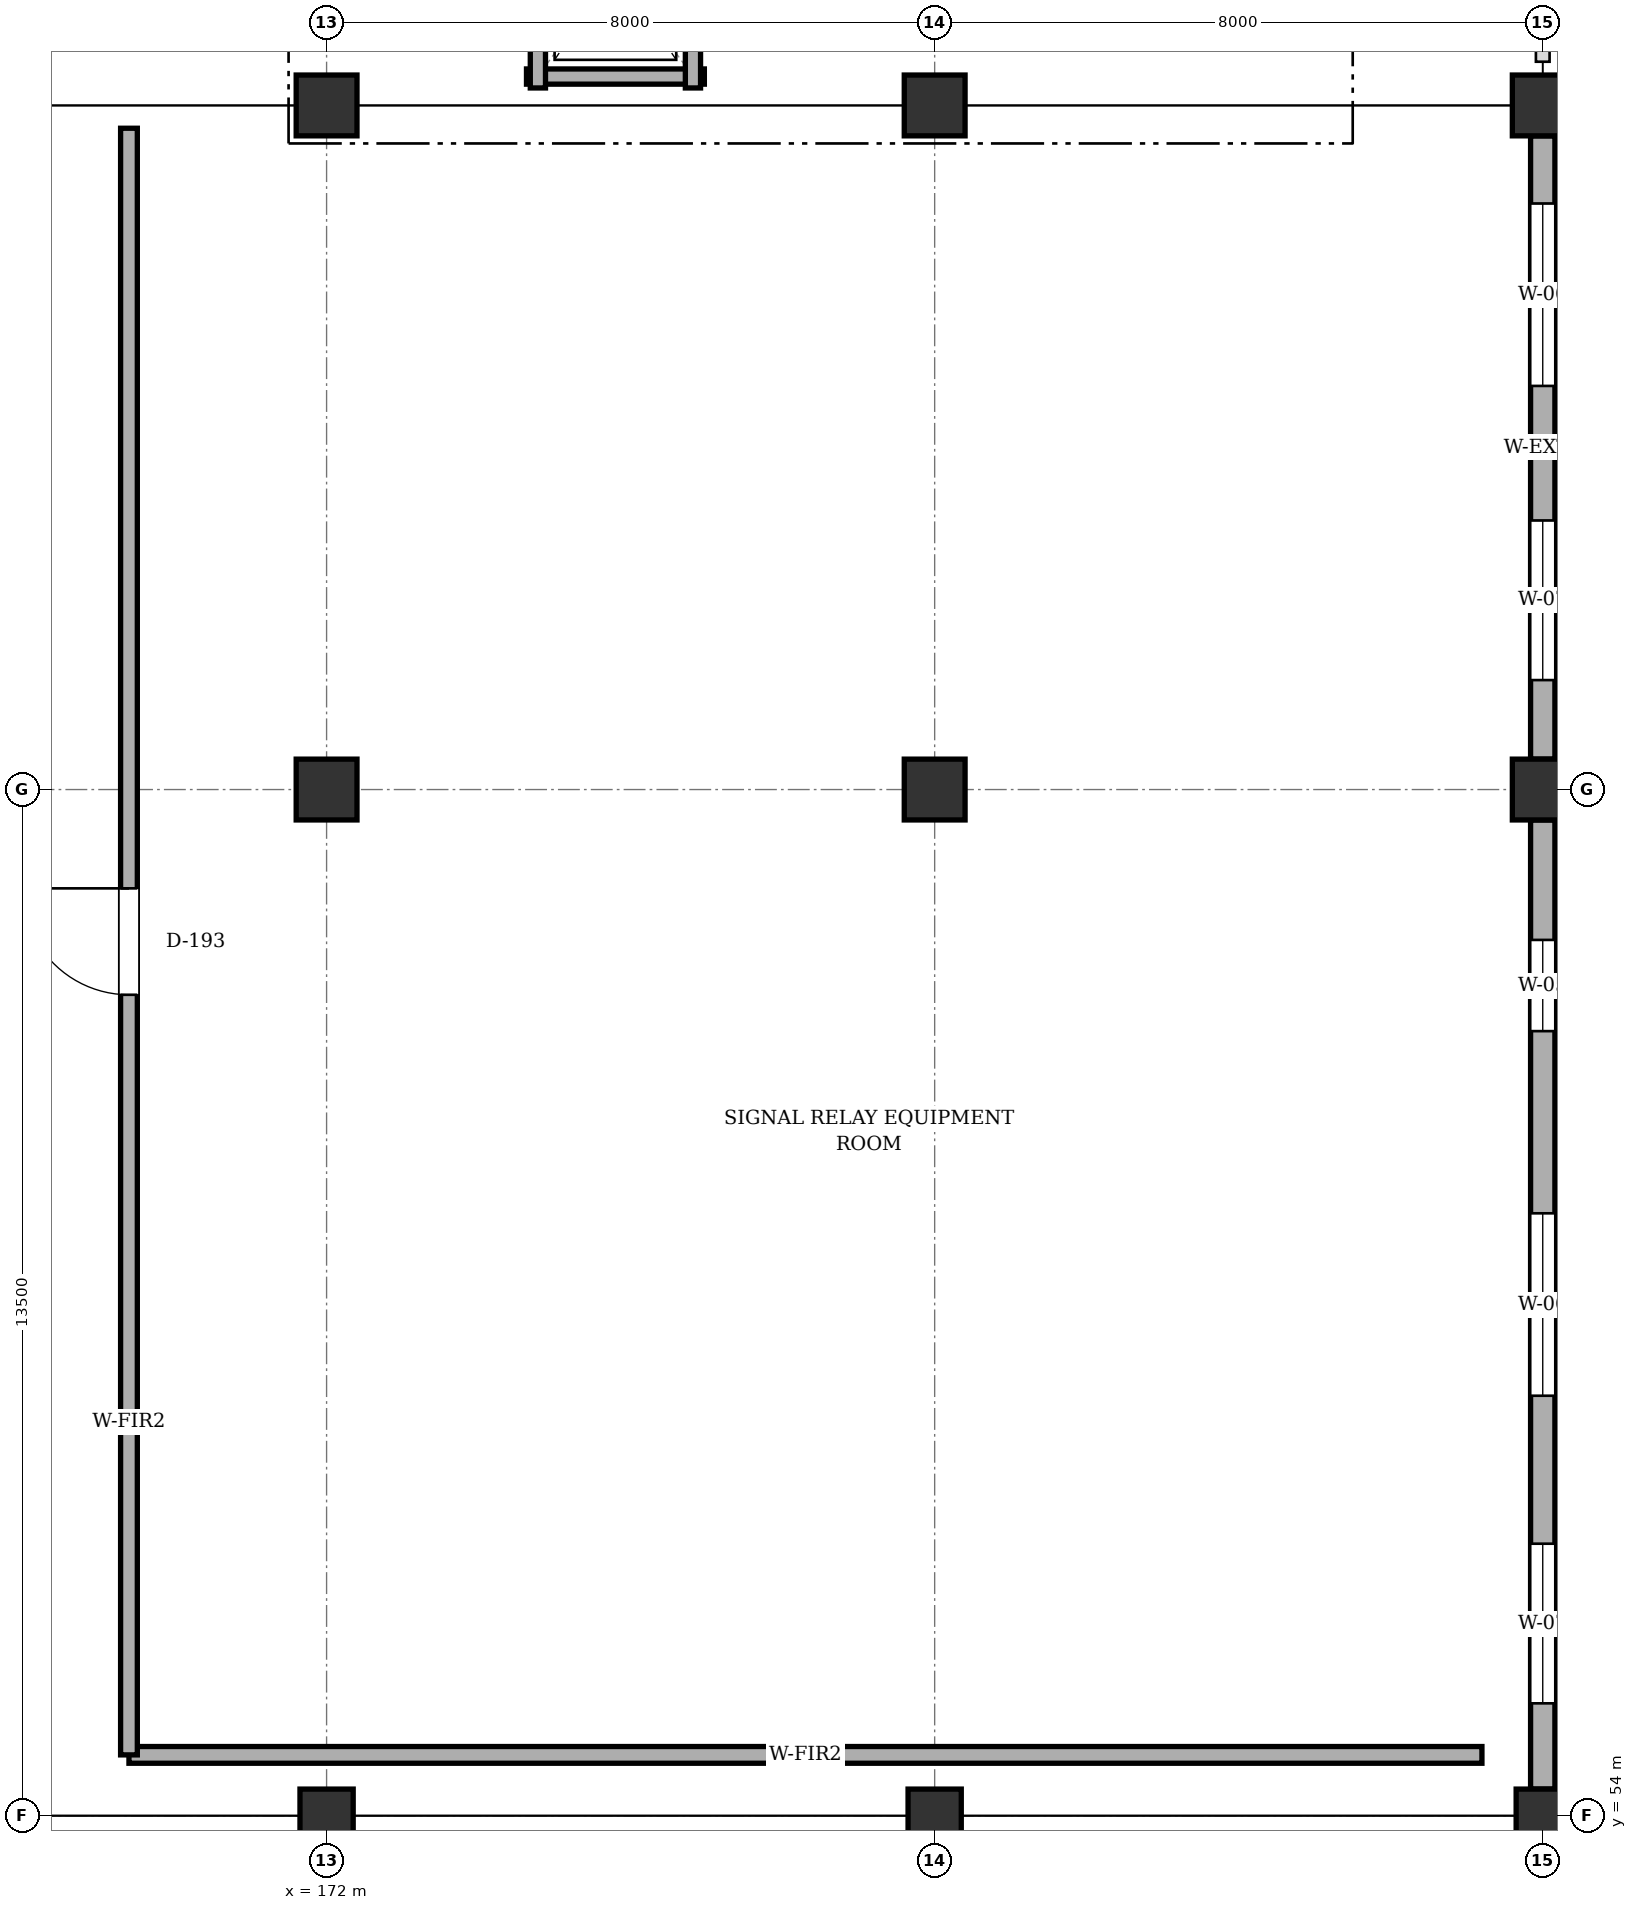
"""IFC4 building model, lengths in metres.
Left out: names, types, materials, properties, quantities, classifications, styles, units other than length and angle.
Written with IfcOpenShell. Run it as: python <this file> out.ifc"""

import sys

from ifc_helpers import new_model, si_unit, direction, frame, frame_2d, origin, origin_2d, place, context, subcontext, project, spatial, rectangle, extrude, element, fill, save


model = new_model("IFC4")
c1 = context("Model", 3, precision=1e-05, world=origin(), true_north=direction((0.0, 1.0)))
c2 = subcontext(c1, "Body", "Model", "MODEL_VIEW")
j1 = project(units=[si_unit("LENGTHUNIT", "METRE"), si_unit("PLANEANGLEUNIT", "RADIAN")], contexts=[c1])
p1 = place(None, origin())
s1 = spatial("IfcSite", under=j1, at=p1, CompositionType="ELEMENT")
p2 = place(p1, origin())
s2 = spatial("IfcBuilding", under=s1, at=p2, CompositionType="ELEMENT")
p3 = place(p2, frame((0.0, 0.0, 6.6)))
s3 = spatial("IfcBuildingStorey", under=s2, at=p3, CompositionType="ELEMENT", Elevation=6.6)
p4 = place(p3, frame((172.0, 54.0, 0.0), z_axis=(0.0, 0.0, 1.0), x_axis=(1.0, 0.0, 0.0)))
e1 = element("IfcColumn", 1, at=p4, inside=s3, PredefinedType="COLUMN", context=c2, shape_type="SweptSolid", body=[
    extrude(rectangle(XDim=0.7, YDim=0.7, at=origin_2d()), origin(), (0.0, 0.0, 1.0), 4.2),
])
for number, where, z_axis, x_axis in (
    (2, (172.0, 67.5, 0.0), (0.0, 0.0, 1.0), (1.0, 0.0, 0.0)),
    (3, (172.0, 76.5, 0.0), (0.0, 0.0, 1.0), (1.0, 0.0, 0.0)),
):
    element("IfcColumn", number, at=place(p3, frame(where, z_axis=z_axis, x_axis=x_axis)), inside=s3, PredefinedType="COLUMN", context=c2, shape_type="SweptSolid", body=[
        extrude(rectangle(XDim=0.8, YDim=0.8, at=origin_2d()), origin(), (0.0, 0.0, 1.0), 4.2),
    ])
p5 = place(p3, frame((180.0, 54.0, 0.0), z_axis=(0.0, 0.0, 1.0), x_axis=(1.0, 0.0, 0.0)))
e4 = element("IfcColumn", 4, at=p5, inside=s3, PredefinedType="COLUMN", context=c2, shape_type="SweptSolid", body=[
    extrude(rectangle(XDim=0.7, YDim=0.7, at=origin_2d()), origin(), (0.0, 0.0, 1.0), 4.2),
])
for number, where, z_axis, x_axis in (
    (5, (180.0, 67.5, 0.0), (0.0, 0.0, 1.0), (1.0, 0.0, 0.0)),
    (6, (180.0, 76.5, 0.0), (0.0, 0.0, 1.0), (1.0, 0.0, 0.0)),
):
    element("IfcColumn", number, at=place(p3, frame(where, z_axis=z_axis, x_axis=x_axis)), inside=s3, PredefinedType="COLUMN", context=c2, shape_type="SweptSolid", body=[
        extrude(rectangle(XDim=0.8, YDim=0.8, at=origin_2d()), origin(), (0.0, 0.0, 1.0), 4.2),
    ])
p6 = place(p3, frame((188.0, 54.0, 0.0), z_axis=(0.0, 0.0, 1.0), x_axis=(1.0, 0.0, 0.0)))
e7 = element("IfcColumn", 7, at=p6, inside=s3, PredefinedType="COLUMN", context=c2, shape_type="SweptSolid", body=[
    extrude(rectangle(XDim=0.7, YDim=0.7, at=origin_2d()), origin(), (0.0, 0.0, 1.0), 4.2),
])
for number, where, z_axis, x_axis in (
    (8, (188.0, 67.5, 0.0), (0.0, 0.0, 1.0), (1.0, 0.0, 0.0)),
    (9, (188.0, 76.5, 0.0), (0.0, 0.0, 1.0), (1.0, 0.0, 0.0)),
):
    element("IfcColumn", number, at=place(p3, frame(where, z_axis=z_axis, x_axis=x_axis)), inside=s3, PredefinedType="COLUMN", context=c2, shape_type="SweptSolid", body=[
        extrude(rectangle(XDim=0.8, YDim=0.8, at=origin_2d()), origin(), (0.0, 0.0, 1.0), 4.2),
    ])
p7 = place(p3, frame((188.0, 67.1, 0.0), z_axis=(0.0, 0.0, 1.0), x_axis=(0.0, -1.0, 0.0)))
e10 = element("IfcWall", 10, at=p7, inside=s3, PredefinedType="SOLIDWALL", context=c2, shape_type="SweptSolid", body=[
    extrude(rectangle(XDim=12.75, YDim=0.32, at=frame_2d((6.375, 0.0))), origin(), (0.0, 0.0, 1.0), 3.345),
])
p8 = place(p7, frame((1.578, 0.0, 0.9)))
e11 = element("IfcOpeningElement", 11, at=p8, cuts=e10, PredefinedType="OPENING", context=c2, shape_type="SweptSolid", body=[
    extrude(rectangle(XDim=1.2, YDim=1.8, at=frame_2d((0.6, 0.9))), frame((0.0, 0.17, 0.0), z_axis=(0.0, -1.0, 0.0), x_axis=(1.0, 0.0, 0.0)), (0.0, 0.0, 1.0), 0.34),
])
p9 = place(p7, frame((5.175, 0.0, 0.9)))
e12 = element("IfcOpeningElement", 12, at=p9, cuts=e10, PredefinedType="OPENING", context=c2, shape_type="SweptSolid", body=[
    extrude(rectangle(XDim=2.4, YDim=1.6, at=frame_2d((1.2, 0.8))), frame((0.0, 0.17, 0.0), z_axis=(0.0, -1.0, 0.0), x_axis=(1.0, 0.0, 0.0)), (0.0, 0.0, 1.0), 0.34),
])
p10 = place(p7, frame((9.522, 0.0, 0.9)))
e13 = element("IfcOpeningElement", 13, at=p10, cuts=e10, PredefinedType="OPENING", context=c2, shape_type="SweptSolid", body=[
    extrude(rectangle(XDim=2.1, YDim=1.6, at=frame_2d((1.05, 0.8))), frame((0.0, 0.17, 0.0), z_axis=(0.0, -1.0, 0.0), x_axis=(1.0, 0.0, 0.0)), (0.0, 0.0, 1.0), 0.34),
])
p11 = place(p3, frame((188.0, 76.1, 0.0), z_axis=(0.0, 0.0, 1.0), x_axis=(0.0, -1.0, 0.0)))
e14 = element("IfcWall", 14, at=p11, inside=s3, PredefinedType="SOLIDWALL", context=c2, shape_type="SweptSolid", body=[
    extrude(rectangle(XDim=8.2, YDim=0.32, at=frame_2d((4.1, 0.0))), origin(), (0.0, 0.0, 1.0), 3.39),
])
p12 = place(p11, frame((0.89, 0.0, 0.9)))
e15 = element("IfcOpeningElement", 15, at=p12, cuts=e14, PredefinedType="OPENING", context=c2, shape_type="SweptSolid", body=[
    extrude(rectangle(XDim=2.4, YDim=1.6, at=frame_2d((1.2, 0.8))), frame((0.0, 0.17, 0.0), z_axis=(0.0, -1.0, 0.0), x_axis=(1.0, 0.0, 0.0)), (0.0, 0.0, 1.0), 0.34),
])
p13 = place(p11, frame((5.06, 0.0, 0.9)))
e16 = element("IfcOpeningElement", 16, at=p13, cuts=e14, PredefinedType="OPENING", context=c2, shape_type="SweptSolid", body=[
    extrude(rectangle(XDim=2.1, YDim=1.6, at=frame_2d((1.05, 0.8))), frame((0.0, 0.17, 0.0), z_axis=(0.0, -1.0, 0.0), x_axis=(1.0, 0.0, 0.0)), (0.0, 0.0, 1.0), 0.34),
])
p14 = place(p3, frame((174.63, 76.88, 0.0), z_axis=(0.0, 0.0, 1.0), x_axis=(1.0, 0.0, 0.0)))
e17 = element("IfcWall", 17, at=p14, inside=s3, PredefinedType="SOLIDWALL", context=c2, shape_type="SweptSolid", body=[
    extrude(rectangle(XDim=2.34, YDim=0.2, at=frame_2d((1.17, 0.0))), origin(), (0.0, 0.0, 1.0), 3.515),
])
for number, where, z_axis, x_axis in (
    (18, (174.78, 79.87, 0.0), (0.0, 0.0, 1.0), (0.0, -1.0, 0.0)),
    (19, (176.82, 76.73, 0.0), (0.0, 0.0, 1.0), (0.0, 1.0, 0.0)),
):
    element("IfcWall", number, at=place(p3, frame(where, z_axis=z_axis, x_axis=x_axis)), inside=s3, PredefinedType="SOLIDWALL", context=c2, shape_type="SweptSolid", body=[
        extrude(rectangle(XDim=3.14, YDim=0.2, at=frame_2d((1.57, 0.0))), origin(), (0.0, 0.0, 1.0), 3.515),
    ])
p15 = place(p3, frame((187.2, 54.8, 0.0), z_axis=(0.0, 0.0, 1.0), x_axis=(-1.0, 0.0, 0.0)))
e20 = element("IfcWall", 20, at=p15, inside=s3, PredefinedType="SOLIDWALL", context=c2, shape_type="SweptSolid", body=[
    extrude(rectangle(XDim=17.8, YDim=0.22, at=frame_2d((8.9, 0.0))), origin(), (0.0, 0.0, 1.0), 3.37),
])
p16 = place(p3, frame((169.4, 54.8, 0.0), z_axis=(0.0, 0.0, 1.0), x_axis=(0.0, 1.0, 0.0)))
e21 = element("IfcWall", 21, at=p16, inside=s3, PredefinedType="SOLIDWALL", context=c2, shape_type="SweptSolid", body=[
    extrude(rectangle(XDim=21.4, YDim=0.22, at=frame_2d((10.7, 0.0))), origin(), (0.0, 0.0, 1.0), 3.485),
])
p17 = place(p16, frame((10.0, 0.0, 0.0)))
e22 = element("IfcOpeningElement", 22, at=p17, cuts=e21, PredefinedType="OPENING", context=c2, shape_type="SweptSolid", body=[
    extrude(rectangle(XDim=1.4, YDim=2.1, at=frame_2d((0.7, 1.05))), frame((0.0, 0.12, 0.0), z_axis=(0.0, -1.0, 0.0), x_axis=(1.0, 0.0, 0.0)), (0.0, 0.0, 1.0), 0.24),
])
p18 = place(p8, origin())
e23 = element("IfcWindow", 23, at=p18, inside=s3, PartitioningType="SINGLE_PANEL", PredefinedType="WINDOW", context=c2, shape_type="SweptSolid", body=[
    extrude(rectangle(XDim=1.2, YDim=1.8, at=frame_2d((0.6, 0.9))), frame((0.0, 0.03, 0.0), z_axis=(0.0, -1.0, 0.0), x_axis=(1.0, 0.0, 0.0)), (0.0, 0.0, 1.0), 0.06),
])
fill(e11, e23)
p19 = place(p9, origin())
e24 = element("IfcWindow", 24, at=p19, inside=s3, PartitioningType="SINGLE_PANEL", PredefinedType="WINDOW", context=c2, shape_type="SweptSolid", body=[
    extrude(rectangle(XDim=2.4, YDim=1.6, at=frame_2d((1.2, 0.8))), frame((0.0, 0.03, 0.0), z_axis=(0.0, -1.0, 0.0), x_axis=(1.0, 0.0, 0.0)), (0.0, 0.0, 1.0), 0.06),
])
fill(e12, e24)
p20 = place(p10, origin())
e25 = element("IfcWindow", 25, at=p20, inside=s3, PartitioningType="SINGLE_PANEL", PredefinedType="WINDOW", context=c2, shape_type="SweptSolid", body=[
    extrude(rectangle(XDim=2.1, YDim=1.6, at=frame_2d((1.05, 0.8))), frame((0.0, 0.03, 0.0), z_axis=(0.0, -1.0, 0.0), x_axis=(1.0, 0.0, 0.0)), (0.0, 0.0, 1.0), 0.06),
])
fill(e13, e25)
p21 = place(p12, origin())
e26 = element("IfcWindow", 26, at=p21, inside=s3, PartitioningType="SINGLE_PANEL", PredefinedType="WINDOW", context=c2, shape_type="SweptSolid", body=[
    extrude(rectangle(XDim=2.4, YDim=1.6, at=frame_2d((1.2, 0.8))), frame((0.0, 0.03, 0.0), z_axis=(0.0, -1.0, 0.0), x_axis=(1.0, 0.0, 0.0)), (0.0, 0.0, 1.0), 0.06),
])
fill(e15, e26)
p22 = place(p13, origin())
e27 = element("IfcWindow", 27, at=p22, inside=s3, PartitioningType="SINGLE_PANEL", PredefinedType="WINDOW", context=c2, shape_type="SweptSolid", body=[
    extrude(rectangle(XDim=2.1, YDim=1.6, at=frame_2d((1.05, 0.8))), frame((0.0, 0.03, 0.0), z_axis=(0.0, -1.0, 0.0), x_axis=(1.0, 0.0, 0.0)), (0.0, 0.0, 1.0), 0.06),
])
fill(e16, e27)
p23 = place(p17, origin())
e28 = element("IfcDoor", 28, at=p23, inside=s3, OperationType="SINGLE_SWING_RIGHT", PredefinedType="DOOR", context=c2, shape_type="SweptSolid", body=[
    extrude(rectangle(XDim=1.4, YDim=2.1, at=frame_2d((0.7, 1.05))), frame((0.0, 0.025, 0.0), z_axis=(0.0, -1.0, 0.0), x_axis=(1.0, 0.0, 0.0)), (0.0, 0.0, 1.0), 0.05),
])
fill(e22, e28)
save(model, sys.argv[1])
